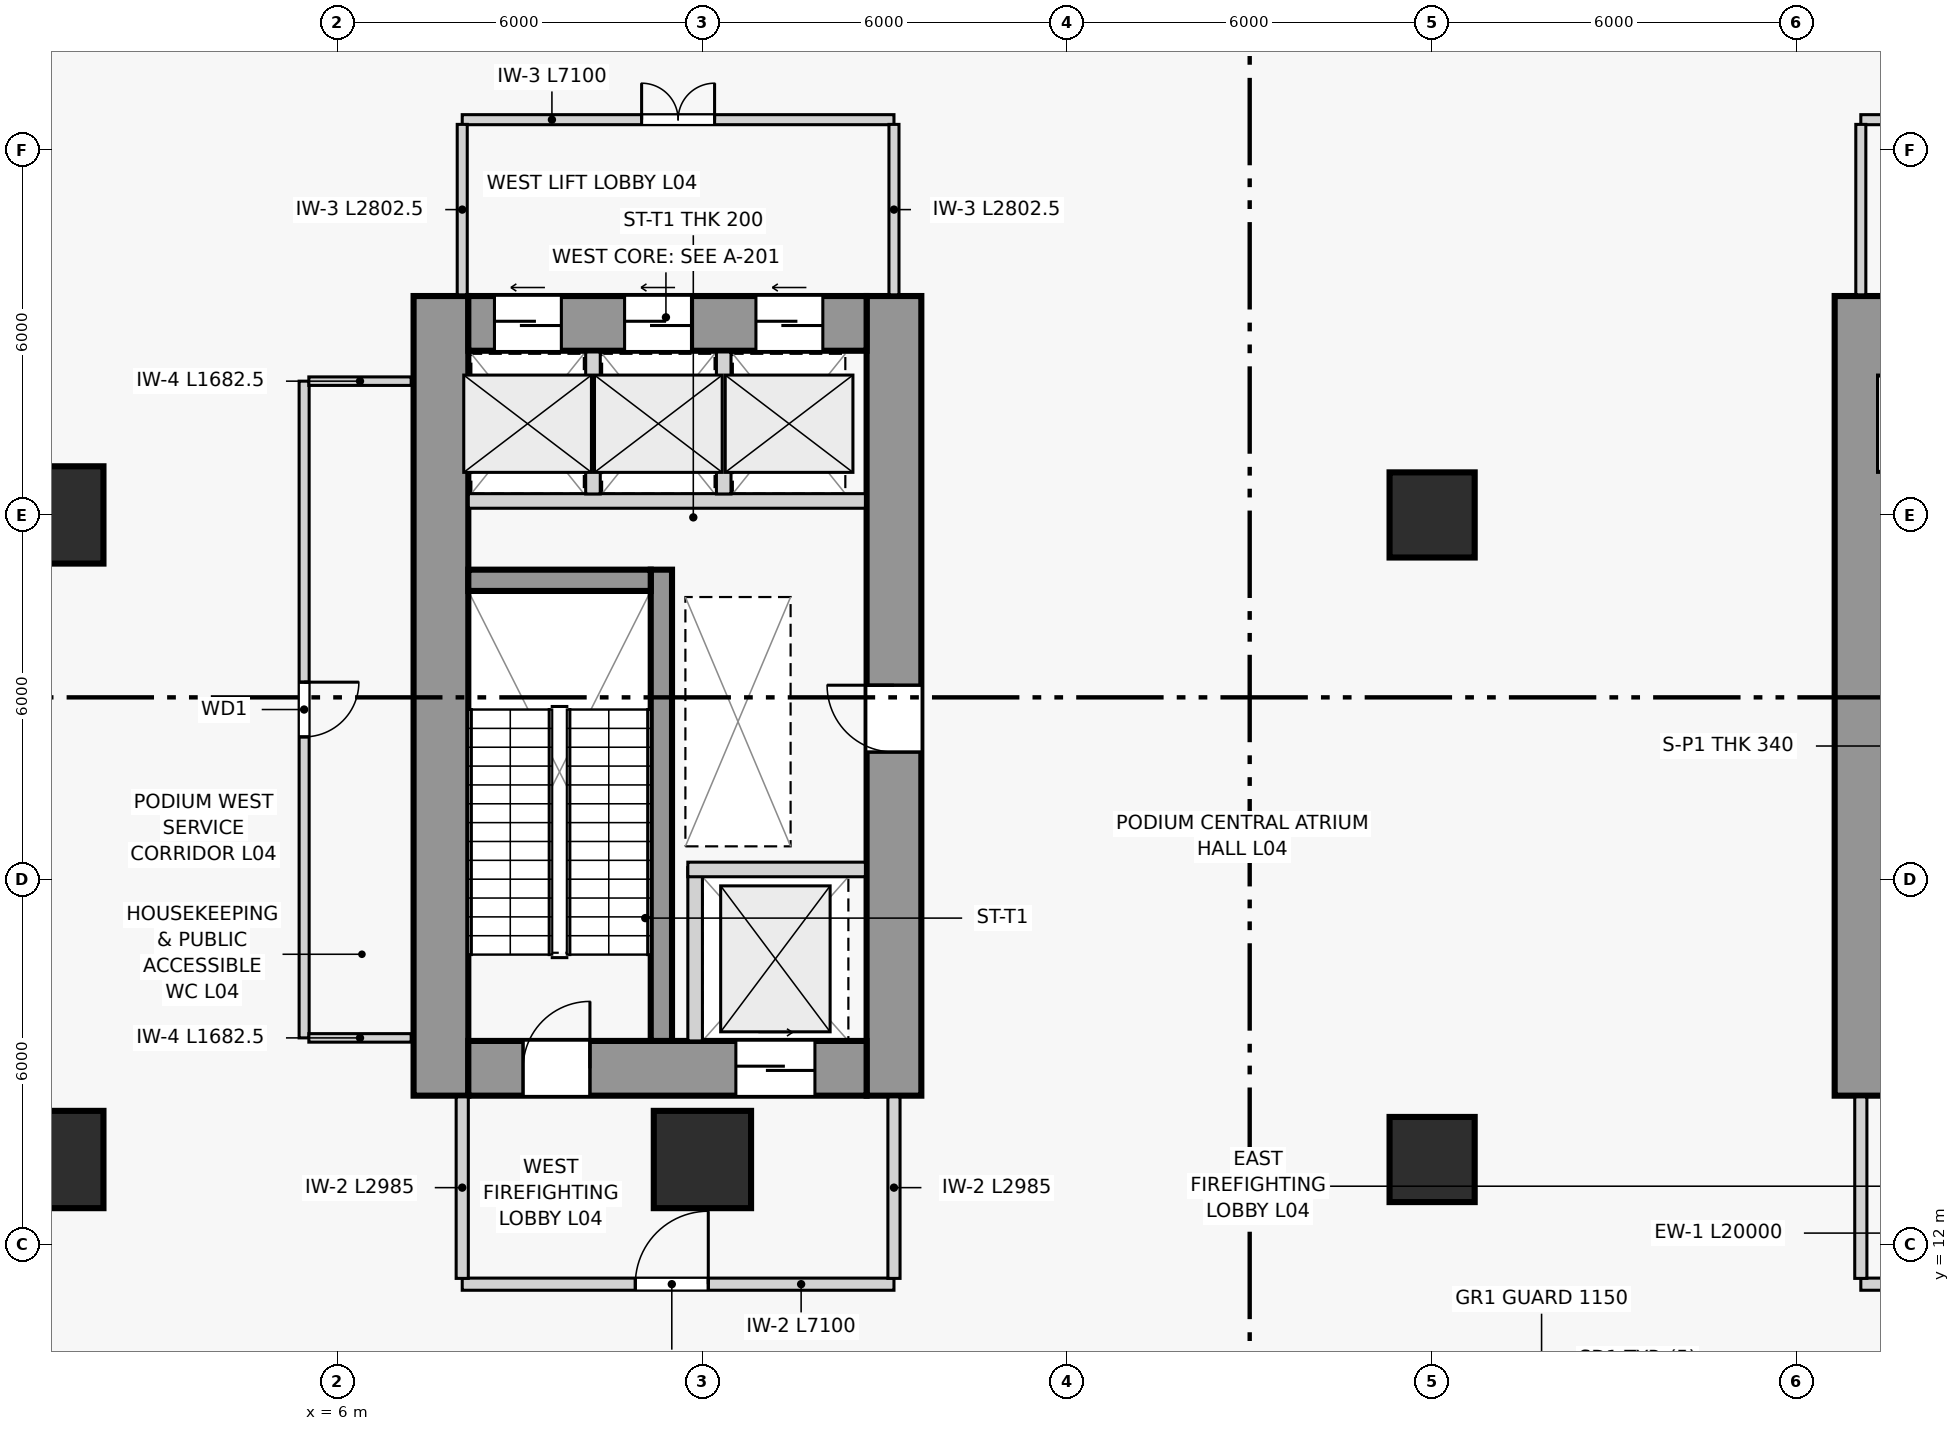
"""IFC4 building model, lengths in metres.
Left out: names, types, materials, properties, quantities, classifications, styles, units other than length and angle.
Written with IfcOpenShell. Run it as: python <this file> out.ifc"""

import sys

from ifc_helpers import new_model, si_unit, direction, frame, frame_2d, origin, origin_2d, place, context, subcontext, project, spatial, rectangle, extrude, source, transform, mapped, element, fill, save


model = new_model("IFC4")
c1 = context("Model", 3, precision=1e-05, world=origin(), true_north=direction((0.0, 1.0)))
c2 = subcontext(c1, "Body", "Model", "MODEL_VIEW")
j1 = project(units=[si_unit("LENGTHUNIT", "METRE"), si_unit("PLANEANGLEUNIT", "RADIAN")], contexts=[c1])
p1 = place(None, origin())
s1 = spatial("IfcSite", under=j1, at=p1, CompositionType="ELEMENT")
p2 = place(p1, origin())
s2 = spatial("IfcBuilding", under=s1, at=p2, CompositionType="ELEMENT")
p3 = place(p2, frame((0.0, 0.0, 18.0)))
s3 = spatial("IfcBuildingStorey", under=s2, at=p3, CompositionType="ELEMENT", Elevation=18.0)
p4 = place(p3, frame((7.7, 14.45, 0.0), z_axis=(0.0, 0.0, 1.0), x_axis=(0.0, 1.0, 0.0)))
e1 = element("IfcWall", 1, at=p4, inside=s3, PredefinedType="SHEAR", context=c2, shape_type="SweptSolid", body=[
    extrude(rectangle(XDim=13.15, YDim=0.9, at=frame_2d((6.575, 0.0))), origin(), (0.0, 0.0, 1.0), 4.5),
])
p5 = place(p3, frame((15.15, 14.45, 0.0), z_axis=(0.0, 0.0, 1.0), x_axis=(0.0, 1.0, 0.0)))
e2 = element("IfcWall", 2, at=p5, inside=s3, PredefinedType="SHEAR", context=c2, shape_type="SweptSolid", body=[
    extrude(rectangle(XDim=13.15, YDim=0.9, at=frame_2d((6.575, 0.0))), origin(), (0.0, 0.0, 1.0), 4.5),
])
p6 = place(p5, frame((5.65, 0.0, 0.0)))
e3 = element("IfcOpeningElement", 3, at=p6, cuts=e2, PredefinedType="OPENING", context=c2, shape_type="SweptSolid", body=[
    extrude(rectangle(XDim=1.1, YDim=2.2, at=frame_2d((0.55, 1.1))), frame((0.0, 0.46, 0.0), z_axis=(0.0, -1.0, 0.0), x_axis=(1.0, 0.0, 0.0)), (0.0, 0.0, 1.0), 0.92),
])
p7 = place(p3, frame((8.15, 14.9, 0.0), z_axis=(0.0, 0.0, 1.0), x_axis=(1.0, 0.0, 0.0)))
e4 = element("IfcWall", 4, at=p7, inside=s3, PredefinedType="SHEAR", context=c2, shape_type="SweptSolid", body=[
    extrude(rectangle(XDim=6.55, YDim=0.9, at=frame_2d((3.275, 0.0))), origin(), (0.0, 0.0, 1.0), 4.5),
])
p8 = place(p7, frame((0.9, 0.0, 0.0)))
e5 = element("IfcOpeningElement", 5, at=p8, cuts=e4, PredefinedType="OPENING", context=c2, shape_type="SweptSolid", body=[
    extrude(rectangle(XDim=1.1, YDim=2.2, at=frame_2d((0.55, 1.1))), frame((0.0, 0.46, 0.0), z_axis=(0.0, -1.0, 0.0), x_axis=(1.0, 0.0, 0.0)), (0.0, 0.0, 1.0), 0.92),
])
p9 = place(p7, frame((4.4, 0.0, 0.0)))
e6 = element("IfcOpeningElement", 6, at=p9, cuts=e4, PredefinedType="OPENING", context=c2, shape_type="SweptSolid", body=[
    extrude(rectangle(XDim=1.3, YDim=2.2, at=frame_2d((0.65, 1.1))), frame((0.0, 0.46, 0.0), z_axis=(0.0, -1.0, 0.0), x_axis=(1.0, 0.0, 0.0)), (0.0, 0.0, 1.0), 0.92),
])
p10 = place(p3, frame((8.15, 27.15, 0.0), z_axis=(0.0, 0.0, 1.0), x_axis=(1.0, 0.0, 0.0)))
e7 = element("IfcWall", 7, at=p10, inside=s3, PredefinedType="SHEAR", context=c2, shape_type="SweptSolid", body=[
    extrude(rectangle(XDim=6.55, YDim=0.9, at=frame_2d((3.275, 0.0))), origin(), (0.0, 0.0, 1.0), 4.5),
])
p11 = place(p10, frame((0.43, 0.0, 0.0)))
e8 = element("IfcOpeningElement", 8, at=p11, cuts=e7, PredefinedType="OPENING", context=c2, shape_type="SweptSolid", body=[
    extrude(rectangle(XDim=1.1, YDim=2.2, at=frame_2d((0.55, 1.1))), frame((0.0, 0.46, 0.0), z_axis=(0.0, -1.0, 0.0), x_axis=(1.0, 0.0, 0.0)), (0.0, 0.0, 1.0), 0.92),
])
p12 = place(p10, frame((2.57, 0.0, 0.0)))
e9 = element("IfcOpeningElement", 9, at=p12, cuts=e7, PredefinedType="OPENING", context=c2, shape_type="SweptSolid", body=[
    extrude(rectangle(XDim=1.1, YDim=2.2, at=frame_2d((0.55, 1.1))), frame((0.0, 0.46, 0.0), z_axis=(0.0, -1.0, 0.0), x_axis=(1.0, 0.0, 0.0)), (0.0, 0.0, 1.0), 0.92),
])
p13 = place(p10, frame((4.73, 0.0, 0.0)))
e10 = element("IfcOpeningElement", 10, at=p13, cuts=e7, PredefinedType="OPENING", context=c2, shape_type="SweptSolid", body=[
    extrude(rectangle(XDim=1.1, YDim=2.2, at=frame_2d((0.55, 1.1))), frame((0.0, 0.46, 0.0), z_axis=(0.0, -1.0, 0.0), x_axis=(1.0, 0.0, 0.0)), (0.0, 0.0, 1.0), 0.92),
])
p14 = place(p3, frame((31.07, 14.45, 0.0), z_axis=(0.0, 0.0, 1.0), x_axis=(0.0, 1.0, 0.0)))
e11 = element("IfcWall", 11, at=p14, inside=s3, PredefinedType="SHEAR", context=c2, shape_type="SweptSolid", body=[
    extrude(rectangle(XDim=13.15, YDim=0.9, at=frame_2d((6.575, 0.0))), origin(), (0.0, 0.0, 1.0), 4.5),
])
p15 = place(p3, frame((11.325, 15.35, 0.0), z_axis=(0.0, 0.0, 1.0), x_axis=(0.0, 1.0, 0.0)))
e12 = element("IfcWall", 12, at=p15, inside=s3, PredefinedType="SHEAR", context=c2, shape_type="SweptSolid", body=[
    extrude(rectangle(XDim=7.75, YDim=0.35, at=frame_2d((3.875, 0.0))), origin(), (0.0, 0.0, 1.0), 4.5),
])
p16 = place(p3, frame((8.15, 22.925, 0.0), z_axis=(0.0, 0.0, 1.0), x_axis=(1.0, 0.0, 0.0)))
e13 = element("IfcWall", 13, at=p16, inside=s3, PredefinedType="SHEAR", context=c2, shape_type="SweptSolid", body=[
    extrude(rectangle(XDim=3.0, YDim=0.35, at=frame_2d((1.5, 0.0))), origin(), (0.0, 0.0, 1.0), 4.5),
])
m1 = source(origin(), c2, "Body", "SweptSolid", [
    extrude(rectangle(XDim=1.6, YDim=1.6, at=origin_2d()), origin(), (0.0, 0.0, 1.0), 4.5),
])
for number, where, z_axis, x_axis in (
    (14, (1.35, 13.4, 0.0), (0.0, 0.0, 1.0), (1.0, 0.0, 0.0)),
    (15, (1.35, 24.0, 0.0), (0.0, 0.0, 1.0), (1.0, 0.0, 0.0)),
    (16, (12.0, 13.4, 0.0), (0.0, 0.0, 1.0), (1.0, 0.0, 0.0)),
):
    element("IfcColumn", number, at=place(p3, frame(where, z_axis=z_axis, x_axis=x_axis)), inside=s3, PredefinedType="COLUMN", context=c2, shape_type="MappedRepresentation", body=[
        mapped(m1, transform((0.0, 0.0, 0.0), scale=1.0)),
    ])
m2 = source(origin(), c2, "Body", "SweptSolid", [
    extrude(rectangle(XDim=1.4, YDim=1.4, at=origin_2d()), origin(), (0.0, 0.0, 1.0), 4.5),
])
for number, where, z_axis, x_axis in (
    (17, (24.0, 13.4, 0.0), (0.0, 0.0, 1.0), (1.0, 0.0, 0.0)),
    (18, (24.0, 24.0, 0.0), (0.0, 0.0, 1.0), (1.0, 0.0, 0.0)),
):
    element("IfcColumn", number, at=place(p3, frame(where, z_axis=z_axis, x_axis=x_axis)), inside=s3, PredefinedType="COLUMN", context=c2, shape_type="MappedRepresentation", body=[
        mapped(m2, transform((0.0, 0.0, 0.0), scale=1.0)),
    ])
p17 = place(p3, frame((11.88, 15.35, 0.0), z_axis=(0.0, 0.0, 1.0), x_axis=(0.0, 1.0, 0.0)))
e19 = element("IfcWall", 19, at=p17, inside=s3, PredefinedType="PARTITIONING", context=c2, shape_type="SweptSolid", body=[
    extrude(rectangle(XDim=2.85, YDim=0.24, at=frame_2d((1.425, 0.0))), origin(), (0.0, 0.0, 1.0), 3.85),
])
p18 = place(p3, frame((11.76, 18.17, 0.0), z_axis=(0.0, 0.0, 1.0), x_axis=(1.0, 0.0, 0.0)))
e20 = element("IfcWall", 20, at=p18, inside=s3, PredefinedType="PARTITIONING", context=c2, shape_type="SweptSolid", body=[
    extrude(rectangle(XDim=2.92, YDim=0.24, at=frame_2d((1.46, 0.0))), origin(), (0.0, 0.0, 1.0), 3.85),
])
p19 = place(p3, frame((8.05, 11.35, 0.0), z_axis=(0.0, 0.0, 1.0), x_axis=(1.0, 0.0, 0.0)))
e21 = element("IfcWall", 21, at=p19, inside=s3, PredefinedType="PARTITIONING", context=c2, shape_type="SweptSolid", body=[
    extrude(rectangle(XDim=7.1, YDim=0.2, at=frame_2d((3.55, 0.0))), origin(), (0.0, 0.0, 1.0), 3.85),
])
p20 = place(p19, frame((2.846, 0.0, 0.0)))
e22 = element("IfcOpeningElement", 22, at=p20, cuts=e21, PredefinedType="OPENING", context=c2, shape_type="SweptSolid", body=[
    extrude(rectangle(XDim=1.2, YDim=2.2, at=frame_2d((0.6, 1.1))), frame((0.0, 0.11, 0.0), z_axis=(0.0, -1.0, 0.0), x_axis=(1.0, 0.0, 0.0)), (0.0, 0.0, 1.0), 0.22),
])
for number, where, z_axis, x_axis in (
    (23, (8.05, 11.445, 0.0), (0.0, 0.0, 1.0), (0.0, 1.0, 0.0)),
    (24, (15.15, 11.445, 0.0), (0.0, 0.0, 1.0), (0.0, 1.0, 0.0)),
):
    element("IfcWall", number, at=place(p3, frame(where, z_axis=z_axis, x_axis=x_axis)), inside=s3, PredefinedType="PARTITIONING", context=c2, shape_type="SweptSolid", body=[
        extrude(rectangle(XDim=2.985, YDim=0.2, at=frame_2d((1.492, 0.0))), origin(), (0.0, 0.0, 1.0), 3.85),
    ])
p21 = place(p3, frame((31.05, 11.35, 0.0), z_axis=(0.0, 0.0, 1.0), x_axis=(1.0, 0.0, 0.0)))
e25 = element("IfcWall", 25, at=p21, inside=s3, PredefinedType="PARTITIONING", context=c2, shape_type="SweptSolid", body=[
    extrude(rectangle(XDim=6.2, YDim=0.2, at=frame_2d((3.1, 0.0))), origin(), (0.0, 0.0, 1.0), 3.85),
])
p22 = place(p21, frame((2.586, 0.0, 0.0)))
e26 = element("IfcOpeningElement", 26, at=p22, cuts=e25, PredefinedType="OPENING", context=c2, shape_type="SweptSolid", body=[
    extrude(rectangle(XDim=1.2, YDim=2.2, at=frame_2d((0.6, 1.1))), frame((0.0, 0.11, 0.0), z_axis=(0.0, -1.0, 0.0), x_axis=(1.0, 0.0, 0.0)), (0.0, 0.0, 1.0), 0.22),
])
p23 = place(p3, frame((31.05, 11.445, 0.0), z_axis=(0.0, 0.0, 1.0), x_axis=(0.0, 1.0, 0.0)))
e27 = element("IfcWall", 27, at=p23, inside=s3, PredefinedType="PARTITIONING", context=c2, shape_type="SweptSolid", body=[
    extrude(rectangle(XDim=2.985, YDim=0.2, at=frame_2d((1.492, 0.0))), origin(), (0.0, 0.0, 1.0), 2.72),
])
p24 = place(p3, frame((8.15, 24.23, 0.0), z_axis=(0.0, 0.0, 1.0), x_axis=(1.0, 0.0, 0.0)))
e28 = element("IfcWall", 28, at=p24, inside=s3, PredefinedType="PARTITIONING", context=c2, shape_type="SweptSolid", body=[
    extrude(rectangle(XDim=6.53, YDim=0.24, at=frame_2d((3.265, 0.0))), origin(), (0.0, 0.0, 1.0), 3.85),
])
for number, where, z_axis, x_axis in (
    (29, (10.2, 24.345, 0.0), (0.0, 0.0, 1.0), (0.0, 1.0, 0.0)),
    (30, (12.35, 24.345, 0.0), (0.0, 0.0, 1.0), (0.0, 1.0, 0.0)),
):
    element("IfcWall", number, at=place(p3, frame(where, z_axis=z_axis, x_axis=x_axis)), inside=s3, PredefinedType="PARTITIONING", context=c2, shape_type="SweptSolid", body=[
        extrude(rectangle(XDim=2.335, YDim=0.24, at=frame_2d((1.167, 0.0))), origin(), (0.0, 0.0, 1.0), 3.85),
    ])
p25 = place(p3, frame((8.05, 30.5, 0.0), z_axis=(0.0, 0.0, 1.0), x_axis=(1.0, 0.0, 0.0)))
e31 = element("IfcWall", 31, at=p25, inside=s3, PredefinedType="PARTITIONING", context=c2, shape_type="SweptSolid", body=[
    extrude(rectangle(XDim=7.1, YDim=0.165, at=frame_2d((3.55, 0.0))), origin(), (0.0, 0.0, 1.0), 3.85),
])
p26 = place(p25, frame((2.95, 0.0, 0.0)))
e32 = element("IfcOpeningElement", 32, at=p26, cuts=e31, PredefinedType="OPENING", context=c2, shape_type="SweptSolid", body=[
    extrude(rectangle(XDim=1.2, YDim=2.2, at=frame_2d((0.6, 1.1))), frame((0.0, 0.093, 0.0), z_axis=(0.0, -1.0, 0.0), x_axis=(1.0, 0.0, 0.0)), (0.0, 0.0, 1.0), 0.185),
])
for number, where, z_axis, x_axis in (
    (33, (8.05, 27.62, 0.0), (0.0, 0.0, 1.0), (0.0, 1.0, 0.0)),
    (34, (15.15, 27.62, 0.0), (0.0, 0.0, 1.0), (0.0, 1.0, 0.0)),
):
    element("IfcWall", number, at=place(p3, frame(where, z_axis=z_axis, x_axis=x_axis)), inside=s3, PredefinedType="PARTITIONING", context=c2, shape_type="SweptSolid", body=[
        extrude(rectangle(XDim=2.802, YDim=0.165, at=frame_2d((1.401, 0.0))), origin(), (0.0, 0.0, 1.0), 3.85),
    ])
p27 = place(p3, frame((31.05, 30.5, 0.0), z_axis=(0.0, 0.0, 1.0), x_axis=(1.0, 0.0, 0.0)))
e35 = element("IfcWall", 35, at=p27, inside=s3, PredefinedType="PARTITIONING", context=c2, shape_type="SweptSolid", body=[
    extrude(rectangle(XDim=6.2, YDim=0.165, at=frame_2d((3.1, 0.0))), origin(), (0.0, 0.0, 1.0), 3.85),
])
p28 = place(p27, frame((2.5, 0.0, 0.0)))
e36 = element("IfcOpeningElement", 36, at=p28, cuts=e35, PredefinedType="OPENING", context=c2, shape_type="SweptSolid", body=[
    extrude(rectangle(XDim=1.2, YDim=2.2, at=frame_2d((0.6, 1.1))), frame((0.0, 0.093, 0.0), z_axis=(0.0, -1.0, 0.0), x_axis=(1.0, 0.0, 0.0)), (0.0, 0.0, 1.0), 0.185),
])
p29 = place(p3, frame((31.05, 27.62, 0.0), z_axis=(0.0, 0.0, 1.0), x_axis=(0.0, 1.0, 0.0)))
e37 = element("IfcWall", 37, at=p29, inside=s3, PredefinedType="PARTITIONING", context=c2, shape_type="SweptSolid", body=[
    extrude(rectangle(XDim=2.802, YDim=0.165, at=frame_2d((1.401, 0.0))), origin(), (0.0, 0.0, 1.0), 2.52),
])
p30 = place(p3, frame((5.45, 15.4, 0.0), z_axis=(0.0, 0.0, 1.0), x_axis=(0.0, 1.0, 0.0)))
e38 = element("IfcWall", 38, at=p30, inside=s3, PredefinedType="PARTITIONING", context=c2, shape_type="SweptSolid", body=[
    extrude(rectangle(XDim=10.8, YDim=0.165, at=frame_2d((5.4, 0.0))), origin(), (0.0, 0.0, 1.0), 3.85),
])
p31 = place(p30, frame((4.95, 0.0, 0.0)))
e39 = element("IfcOpeningElement", 39, at=p31, cuts=e38, PredefinedType="OPENING", context=c2, shape_type="SweptSolid", body=[
    extrude(rectangle(XDim=0.9, YDim=2.1, at=frame_2d((0.45, 1.05))), frame((0.0, 0.093, 0.0), z_axis=(0.0, -1.0, 0.0), x_axis=(1.0, 0.0, 0.0)), (0.0, 0.0, 1.0), 0.185),
])
for number, where, z_axis, x_axis in (
    (40, (5.528, 15.4, 0.0), (0.0, 0.0, 1.0), (1.0, 0.0, 0.0)),
    (41, (5.528, 26.2, 0.0), (0.0, 0.0, 1.0), (1.0, 0.0, 0.0)),
):
    element("IfcWall", number, at=place(p3, frame(where, z_axis=z_axis, x_axis=x_axis)), inside=s3, PredefinedType="PARTITIONING", context=c2, shape_type="SweptSolid", body=[
        extrude(rectangle(XDim=1.682, YDim=0.14, at=frame_2d((0.841, 0.0))), origin(), (0.0, 0.0, 1.0), 3.85),
    ])
m3 = source(origin(), c2, "Body", "SweptSolid", [
    extrude(rectangle(XDim=1.1, YDim=2.2, at=frame_2d((0.55, 1.1))), frame((0.0, 0.025, 0.0), z_axis=(0.0, -1.0, 0.0), x_axis=(1.0, 0.0, 0.0)), (0.0, 0.0, 1.0), 0.05),
])
p32 = place(p8, origin())
e42 = element("IfcDoor", 42, at=p32, inside=s3, OperationType="SINGLE_SWING_RIGHT", PredefinedType="DOOR", context=c2, shape_type="MappedRepresentation", body=[
    mapped(m3, transform((0.0, 0.0, 0.0), scale=1.0)),
])
fill(e5, e42)
m4 = source(origin(), c2, "Body", "SweptSolid", [
    extrude(rectangle(XDim=1.3, YDim=2.2, at=frame_2d((0.65, 1.1))), frame((0.0, 0.025, 0.0), z_axis=(0.0, -1.0, 0.0), x_axis=(1.0, 0.0, 0.0)), (0.0, 0.0, 1.0), 0.05),
])
p33 = place(p9, origin())
e43 = element("IfcDoor", 43, at=p33, inside=s3, OperationType="SLIDING_TO_RIGHT", PredefinedType="DOOR", context=c2, shape_type="MappedRepresentation", body=[
    mapped(m4, transform((0.0, 0.0, 0.0), scale=1.0)),
])
fill(e6, e43)
m5 = source(origin(), c2, "Body", "SweptSolid", [
    extrude(rectangle(XDim=1.2, YDim=2.2, at=frame_2d((0.6, 1.1))), frame((0.0, 0.025, 0.0), z_axis=(0.0, -1.0, 0.0), x_axis=(1.0, 0.0, 0.0)), (0.0, 0.0, 1.0), 0.05),
])
p34 = place(p20, origin())
e44 = element("IfcDoor", 44, at=p34, inside=s3, OperationType="SINGLE_SWING_RIGHT", PredefinedType="DOOR", context=c2, shape_type="MappedRepresentation", body=[
    mapped(m5, transform((0.0, 0.0, 0.0), scale=1.0)),
])
fill(e22, e44)
m6 = source(origin(), c2, "Body", "SweptSolid", [
    extrude(rectangle(XDim=1.1, YDim=2.2, at=frame_2d((0.55, 1.1))), frame((0.0, 0.025, 0.0), z_axis=(0.0, -1.0, 0.0), x_axis=(1.0, 0.0, 0.0)), (0.0, 0.0, 1.0), 0.05),
])
p35 = place(p11, origin())
e45 = element("IfcDoor", 45, at=p35, inside=s3, OperationType="SLIDING_TO_LEFT", PredefinedType="DOOR", context=c2, shape_type="MappedRepresentation", body=[
    mapped(m6, transform((0.0, 0.0, 0.0), scale=1.0)),
])
fill(e8, e45)
p36 = place(p12, origin())
e46 = element("IfcDoor", 46, at=p36, inside=s3, OperationType="SLIDING_TO_LEFT", PredefinedType="DOOR", context=c2, shape_type="MappedRepresentation", body=[
    mapped(m6, transform((0.0, 0.0, 0.0), scale=1.0)),
])
fill(e9, e46)
p37 = place(p13, origin())
e47 = element("IfcDoor", 47, at=p37, inside=s3, OperationType="SLIDING_TO_LEFT", PredefinedType="DOOR", context=c2, shape_type="MappedRepresentation", body=[
    mapped(m6, transform((0.0, 0.0, 0.0), scale=1.0)),
])
fill(e10, e47)
p38 = place(p26, origin())
e48 = element("IfcDoor", 48, at=p38, inside=s3, OperationType="DOUBLE_DOOR_SINGLE_SWING", PredefinedType="DOOR", context=c2, shape_type="MappedRepresentation", body=[
    mapped(m5, transform((0.0, 0.0, 0.0), scale=1.0)),
])
fill(e32, e48)
p39 = place(p6, origin())
e49 = element("IfcDoor", 49, at=p39, inside=s3, OperationType="SINGLE_SWING_RIGHT", PredefinedType="DOOR", context=c2, shape_type="MappedRepresentation", body=[
    mapped(m3, transform((0.0, 0.0, 0.0), scale=1.0)),
])
fill(e3, e49)
m7 = source(origin(), c2, "Body", "SweptSolid", [
    extrude(rectangle(XDim=0.9, YDim=2.1, at=frame_2d((0.45, 1.05))), frame((0.0, 0.025, 0.0), z_axis=(0.0, -1.0, 0.0), x_axis=(1.0, 0.0, 0.0)), (0.0, 0.0, 1.0), 0.05),
])
p40 = place(p31, frame((0.9, 0.0, 0.0), z_axis=(0.0, 0.0, 1.0), x_axis=(-1.0, 0.0, 0.0)))
e50 = element("IfcDoor", 50, at=p40, inside=s3, OperationType="SINGLE_SWING_LEFT", PredefinedType="DOOR", context=c2, shape_type="MappedRepresentation", body=[
    mapped(m7, transform((0.0, 0.0, 0.0), scale=1.0)),
])
fill(e39, e50)
save(model, sys.argv[1])
